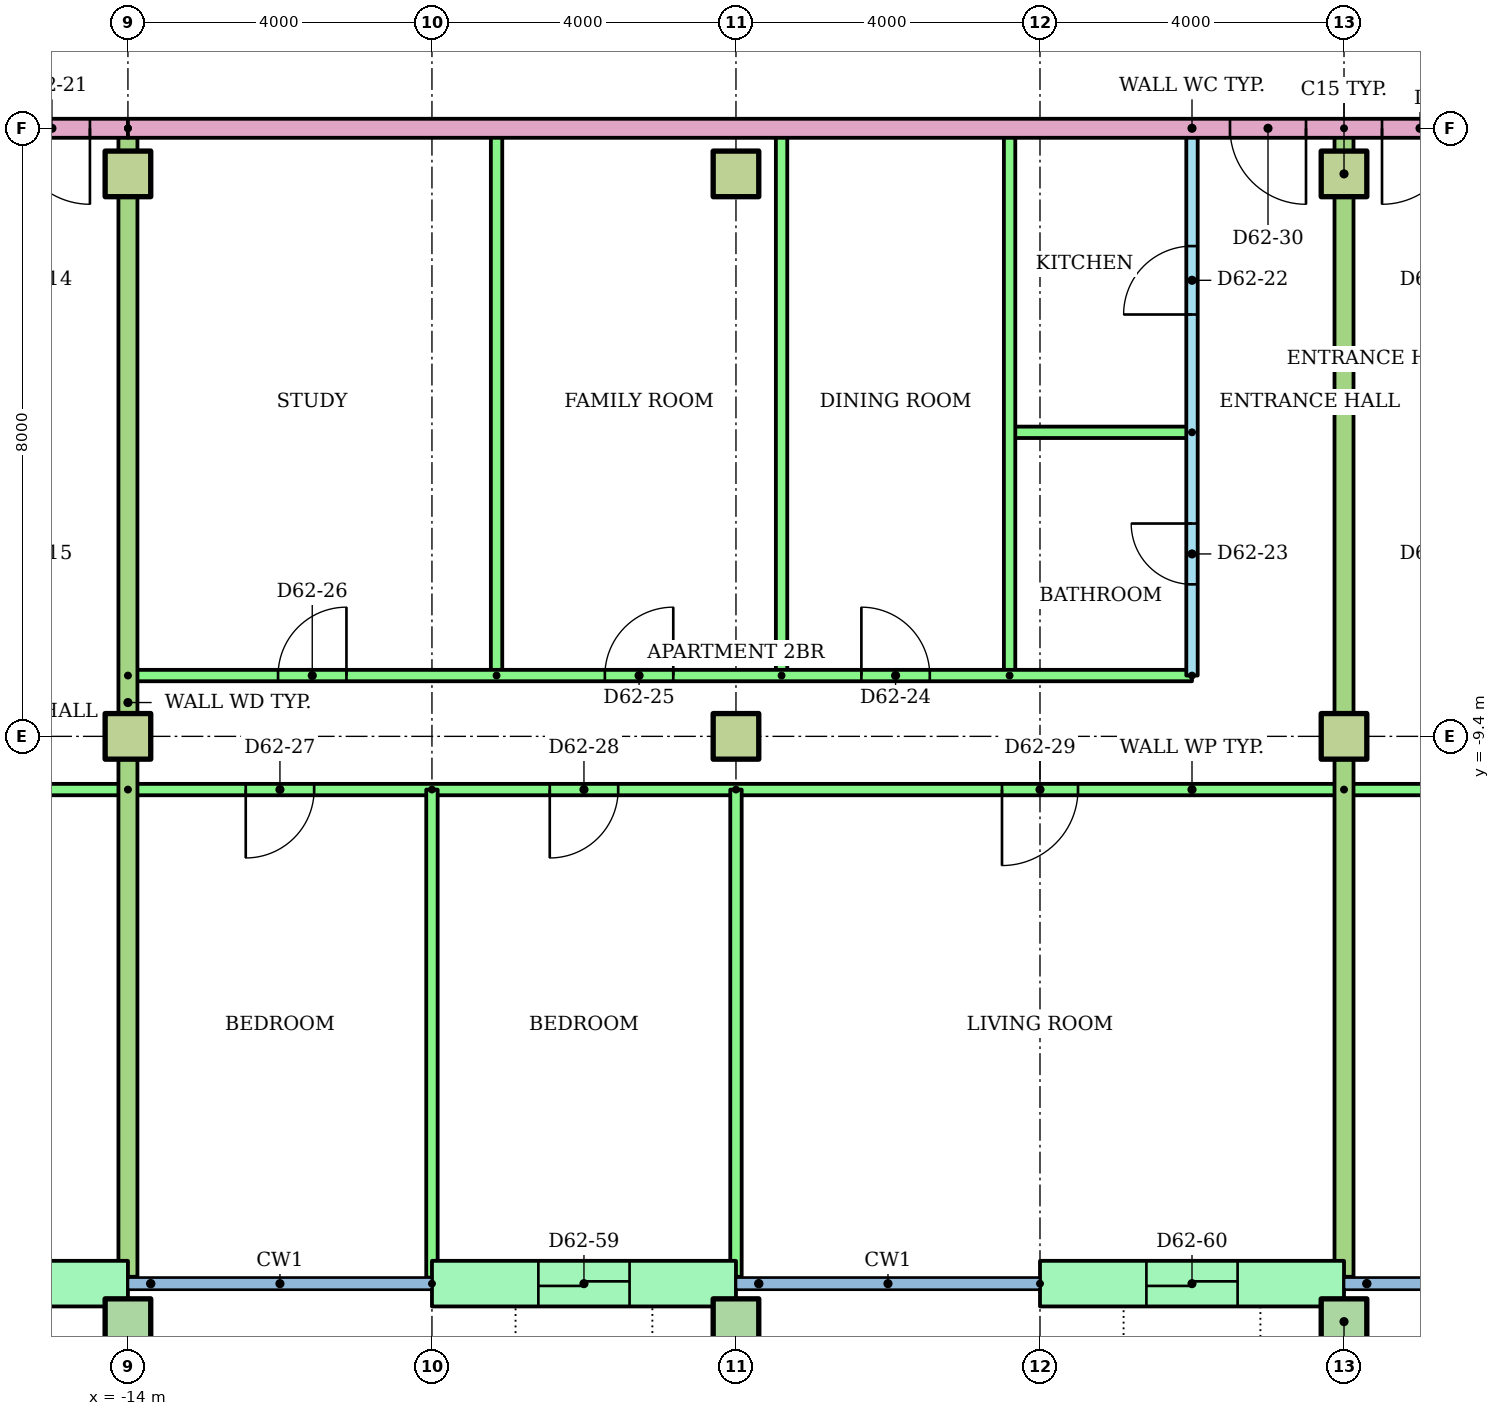
"""IFC4 building model, lengths in metres.
Left out: names, types, materials, properties, quantities, classifications, styles, units other than length and angle.
Written with IfcOpenShell. Run it as: python <this file> out.ifc"""

import sys

from ifc_helpers import new_model, si_unit, direction, frame, frame_2d, origin, origin_2d, place, context, subcontext, project, spatial, rectangle, hollow_rectangle, extrude, element, fill, save


model = new_model("IFC4")
c1 = context("Model", 3, precision=1e-05, world=origin(), true_north=direction((0.0, 1.0)))
c2 = subcontext(c1, "Body", "Model", "MODEL_VIEW")
j1 = project(units=[si_unit("LENGTHUNIT", "METRE"), si_unit("PLANEANGLEUNIT", "RADIAN")], contexts=[c1])
p1 = place(None, origin())
s1 = spatial("IfcSite", under=j1, at=p1, CompositionType="ELEMENT")
p2 = place(p1, origin())
s2 = spatial("IfcBuilding", under=s1, at=p2, CompositionType="ELEMENT")
p3 = place(p2, frame((0.0, 0.0, 236.4)))
s3 = spatial("IfcBuildingStorey", under=s2, at=p3, CompositionType="ELEMENT", Elevation=236.4)
for number, where in (
    (1, (-14.0, -17.1, 0.0)),
    (2, (-6.0, -17.1, 0.0)),
    (3, (2.0, -17.1, 0.0)),
):
    element("IfcColumn", number, at=place(p3, frame(where)), inside=s3, PredefinedType="COLUMN", context=c2, shape_type="SweptSolid", body=[
        extrude(hollow_rectangle(XDim=0.6, YDim=0.6, WallThickness=0.03, at=origin_2d()), origin(), (0.0, 0.0, 1.0), 3.2),
    ])
for number, where in (
    (4, (-14.0, -9.4, 0.0)),
    (5, (-6.0, -9.4, 0.0)),
    (6, (2.0, -9.4, 0.0)),
    (7, (-14.0, -2.0, 0.0)),
    (8, (-6.0, -2.0, 0.0)),
    (9, (2.0, -2.0, 0.0)),
):
    element("IfcColumn", number, at=place(p3, frame(where)), inside=s3, PredefinedType="COLUMN", context=c2, shape_type="SweptSolid", body=[
        extrude(rectangle(XDim=0.6, YDim=0.6, at=origin_2d()), origin(), (0.0, 0.0, 1.0), 3.2),
    ])
p4 = place(p3, frame((-18.0, -16.6, 0.0)))
e10 = element("IfcWall", 10, at=p4, inside=s3, PredefinedType="STANDARD", context=c2, shape_type="SweptSolid", body=[
    extrude(rectangle(XDim=4.0, YDim=0.6, at=frame_2d((2.0, 0.0))), origin(), (0.0, 0.0, 1.0), 2.8),
])
p5 = place(p4, frame((1.4, 0.0, 0.0)))
e11 = element("IfcOpeningElement", 11, at=p5, cuts=e10, PredefinedType="OPENING", context=c2, shape_type="SweptSolid", body=[
    extrude(rectangle(XDim=1.2, YDim=2.1, at=frame_2d((0.6, 1.05))), frame((0.0, 0.31, 0.0), z_axis=(0.0, -1.0, 0.0), x_axis=(1.0, 0.0, 0.0)), (0.0, 0.0, 1.0), 0.62),
])
p6 = place(p3, frame((-10.0, -16.6, 0.0)))
e12 = element("IfcWall", 12, at=p6, inside=s3, PredefinedType="STANDARD", context=c2, shape_type="SweptSolid", body=[
    extrude(rectangle(XDim=4.0, YDim=0.6, at=frame_2d((2.0, 0.0))), origin(), (0.0, 0.0, 1.0), 2.8),
])
p7 = place(p6, frame((1.4, 0.0, 0.0)))
e13 = element("IfcOpeningElement", 13, at=p7, cuts=e12, PredefinedType="OPENING", context=c2, shape_type="SweptSolid", body=[
    extrude(rectangle(XDim=1.2, YDim=2.1, at=frame_2d((0.6, 1.05))), frame((0.0, 0.31, 0.0), z_axis=(0.0, -1.0, 0.0), x_axis=(1.0, 0.0, 0.0)), (0.0, 0.0, 1.0), 0.62),
])
p8 = place(p3, frame((-2.0, -16.6, 0.0)))
e14 = element("IfcWall", 14, at=p8, inside=s3, PredefinedType="STANDARD", context=c2, shape_type="SweptSolid", body=[
    extrude(rectangle(XDim=4.0, YDim=0.6, at=frame_2d((2.0, 0.0))), origin(), (0.0, 0.0, 1.0), 2.8),
])
p9 = place(p8, frame((1.4, 0.0, 0.0)))
e15 = element("IfcOpeningElement", 15, at=p9, cuts=e14, PredefinedType="OPENING", context=c2, shape_type="SweptSolid", body=[
    extrude(rectangle(XDim=1.2, YDim=2.1, at=frame_2d((0.6, 1.05))), frame((0.0, 0.31, 0.0), z_axis=(0.0, -1.0, 0.0), x_axis=(1.0, 0.0, 0.0)), (0.0, 0.0, 1.0), 0.62),
])
p10 = place(p3, frame((-14.0, -10.1, 0.0), z_axis=(0.0, 0.0, 1.0), x_axis=(-1.0, 0.0, 0.0)))
e16 = element("IfcWall", 16, at=p10, inside=s3, PredefinedType="PARTITIONING", context=c2, shape_type="SweptSolid", body=[
    extrude(rectangle(XDim=14.92, YDim=0.15, at=frame_2d((7.46, 0.0))), origin(), (0.0, 0.0, 1.0), 2.4),
])
p11 = place(p10, frame((12.0, 0.0, 0.0)))
e17 = element("IfcOpeningElement", 17, at=p11, cuts=e16, PredefinedType="OPENING", context=c2, shape_type="SweptSolid", body=[
    extrude(rectangle(XDim=0.9, YDim=2.1, at=frame_2d((0.45, 1.05))), frame((0.0, 0.085, 0.0), z_axis=(0.0, -1.0, 0.0), x_axis=(1.0, 0.0, 0.0)), (0.0, 0.0, 1.0), 0.17),
])
p12 = place(p10, frame((6.624, 0.0, 0.0)))
e18 = element("IfcOpeningElement", 18, at=p12, cuts=e16, PredefinedType="OPENING", context=c2, shape_type="SweptSolid", body=[
    extrude(rectangle(XDim=0.9, YDim=2.1, at=frame_2d((0.45, 1.05))), frame((0.0, 0.085, 0.0), z_axis=(0.0, -1.0, 0.0), x_axis=(1.0, 0.0, 0.0)), (0.0, 0.0, 1.0), 0.17),
])
p13 = place(p10, frame((1.5, 0.0, 0.0)))
e19 = element("IfcOpeningElement", 19, at=p13, cuts=e16, PredefinedType="OPENING", context=c2, shape_type="SweptSolid", body=[
    extrude(rectangle(XDim=1.0, YDim=2.1, at=frame_2d((0.5, 1.05))), frame((0.0, 0.085, 0.0), z_axis=(0.0, -1.0, 0.0), x_axis=(1.0, 0.0, 0.0)), (0.0, 0.0, 1.0), 0.17),
])
p14 = place(p3, frame((0.0, -8.6, 0.0), z_axis=(0.0, 0.0, 1.0), x_axis=(0.0, 1.0, 0.0)))
e20 = element("IfcWall", 20, at=p14, inside=s3, PredefinedType="PARTITIONING", context=c2, shape_type="SweptSolid", body=[
    extrude(rectangle(XDim=7.2, YDim=0.15, at=frame_2d((3.6, 0.0))), origin(), (0.0, 0.0, 1.0), 2.4),
])
p15 = place(p14, frame((4.75, 0.0, 0.0)))
e21 = element("IfcOpeningElement", 21, at=p15, cuts=e20, PredefinedType="OPENING", context=c2, shape_type="SweptSolid", body=[
    extrude(rectangle(XDim=0.9, YDim=2.1, at=frame_2d((0.45, 1.05))), frame((0.0, 0.085, 0.0), z_axis=(0.0, -1.0, 0.0), x_axis=(1.0, 0.0, 0.0)), (0.0, 0.0, 1.0), 0.17),
])
p16 = place(p14, frame((1.2, 0.0, 0.0)))
e22 = element("IfcOpeningElement", 22, at=p16, cuts=e20, PredefinedType="OPENING", context=c2, shape_type="SweptSolid", body=[
    extrude(rectangle(XDim=0.8, YDim=2.1, at=frame_2d((0.4, 1.05))), frame((0.0, 0.085, 0.0), z_axis=(0.0, -1.0, 0.0), x_axis=(1.0, 0.0, 0.0)), (0.0, 0.0, 1.0), 0.17),
])
p17 = place(p3, frame((0.0, -5.4, 0.0), z_axis=(0.0, 0.0, 1.0), x_axis=(-1.0, 0.0, 0.0)))
e23 = element("IfcWall", 23, at=p17, inside=s3, PredefinedType="PARTITIONING", context=c2, shape_type="SweptSolid", body=[
    extrude(rectangle(XDim=2.4, YDim=0.15, at=frame_2d((1.2, 0.0))), origin(), (0.0, 0.0, 1.0), 2.4),
])
for number, where, z_axis, x_axis in (
    (24, (-2.4, -8.6, 0.0), (0.0, 0.0, 1.0), (0.0, 1.0, 0.0)),
    (25, (-5.4, -8.6, 0.0), (0.0, 0.0, 1.0), (0.0, 1.0, 0.0)),
    (26, (-9.15, -8.6, 0.0), (0.0, 0.0, 1.0), (0.0, 1.0, 0.0)),
):
    element("IfcWall", number, at=place(p3, frame(where, z_axis=z_axis, x_axis=x_axis)), inside=s3, PredefinedType="PARTITIONING", context=c2, shape_type="SweptSolid", body=[
        extrude(rectangle(XDim=7.2, YDim=0.15, at=frame_2d((3.6, 0.0))), origin(), (0.0, 0.0, 1.0), 2.4),
    ])
p18 = place(p3, frame((-14.0, -8.6, 0.0)))
e27 = element("IfcWall", 27, at=p18, inside=s3, PredefinedType="PARTITIONING", context=c2, shape_type="SweptSolid", body=[
    extrude(rectangle(XDim=14.0, YDim=0.15, at=frame_2d((7.0, 0.0))), origin(), (0.0, 0.0, 1.0), 2.4),
])
p19 = place(p18, frame((9.65, 0.0, 0.0)))
e28 = element("IfcOpeningElement", 28, at=p19, cuts=e27, PredefinedType="OPENING", context=c2, shape_type="SweptSolid", body=[
    extrude(rectangle(XDim=0.9, YDim=2.1, at=frame_2d((0.45, 1.05))), frame((0.0, 0.085, 0.0), z_axis=(0.0, -1.0, 0.0), x_axis=(1.0, 0.0, 0.0)), (0.0, 0.0, 1.0), 0.17),
])
p20 = place(p18, frame((6.275, 0.0, 0.0)))
e29 = element("IfcOpeningElement", 29, at=p20, cuts=e27, PredefinedType="OPENING", context=c2, shape_type="SweptSolid", body=[
    extrude(rectangle(XDim=0.9, YDim=2.1, at=frame_2d((0.45, 1.05))), frame((0.0, 0.085, 0.0), z_axis=(0.0, -1.0, 0.0), x_axis=(1.0, 0.0, 0.0)), (0.0, 0.0, 1.0), 0.17),
])
p21 = place(p18, frame((1.975, 0.0, 0.0)))
e30 = element("IfcOpeningElement", 30, at=p21, cuts=e27, PredefinedType="OPENING", context=c2, shape_type="SweptSolid", body=[
    extrude(rectangle(XDim=0.9, YDim=2.1, at=frame_2d((0.45, 1.05))), frame((0.0, 0.085, 0.0), z_axis=(0.0, -1.0, 0.0), x_axis=(1.0, 0.0, 0.0)), (0.0, 0.0, 1.0), 0.17),
])
p22 = place(p3, frame((2.0, -10.1, 0.0), z_axis=(0.0, 0.0, 1.0), x_axis=(-1.0, 0.0, 0.0)))
e31 = element("IfcWall", 31, at=p22, inside=s3, PredefinedType="PARTITIONING", context=c2, shape_type="SweptSolid", body=[
    extrude(rectangle(XDim=16.0, YDim=0.15, at=frame_2d((8.0, 0.0))), origin(), (0.0, 0.0, 1.0), 2.4),
])
p23 = place(p22, frame((13.55, 0.0, 0.0)))
e32 = element("IfcOpeningElement", 32, at=p23, cuts=e31, PredefinedType="OPENING", context=c2, shape_type="SweptSolid", body=[
    extrude(rectangle(XDim=0.9, YDim=2.1, at=frame_2d((0.45, 1.05))), frame((0.0, 0.085, 0.0), z_axis=(0.0, -1.0, 0.0), x_axis=(1.0, 0.0, 0.0)), (0.0, 0.0, 1.0), 0.17),
])
p24 = place(p22, frame((9.55, 0.0, 0.0)))
e33 = element("IfcOpeningElement", 33, at=p24, cuts=e31, PredefinedType="OPENING", context=c2, shape_type="SweptSolid", body=[
    extrude(rectangle(XDim=0.9, YDim=2.1, at=frame_2d((0.45, 1.05))), frame((0.0, 0.085, 0.0), z_axis=(0.0, -1.0, 0.0), x_axis=(1.0, 0.0, 0.0)), (0.0, 0.0, 1.0), 0.17),
])
p25 = place(p22, frame((3.5, 0.0, 0.0)))
e34 = element("IfcOpeningElement", 34, at=p25, cuts=e31, PredefinedType="OPENING", context=c2, shape_type="SweptSolid", body=[
    extrude(rectangle(XDim=1.0, YDim=2.1, at=frame_2d((0.5, 1.05))), frame((0.0, 0.085, 0.0), z_axis=(0.0, -1.0, 0.0), x_axis=(1.0, 0.0, 0.0)), (0.0, 0.0, 1.0), 0.17),
])
p26 = place(p3, frame((-10.0, -10.1, 0.0), z_axis=(0.0, 0.0, 1.0), x_axis=(0.0, -1.0, 0.0)))
e35 = element("IfcWall", 35, at=p26, inside=s3, PredefinedType="PARTITIONING", context=c2, shape_type="SweptSolid", body=[
    extrude(rectangle(XDim=6.421, YDim=0.15, at=frame_2d((3.21, 0.0))), origin(), (0.0, 0.0, 1.0), 2.4),
])
p27 = place(p3, frame((-6.0, -10.1, 0.0), z_axis=(0.0, 0.0, 1.0), x_axis=(0.0, -1.0, 0.0)))
e36 = element("IfcWall", 36, at=p27, inside=s3, PredefinedType="PARTITIONING", context=c2, shape_type="SweptSolid", body=[
    extrude(rectangle(XDim=6.41, YDim=0.15, at=frame_2d((3.205, 0.0))), origin(), (0.0, 0.0, 1.0), 2.4),
])
p28 = place(p3, frame((-14.0, -1.4, 0.0), z_axis=(0.0, 0.0, 1.0), x_axis=(0.0, -1.0, 0.0)))
e37 = element("IfcWall", 37, at=p28, inside=s3, PredefinedType="PARTITIONING", context=c2, shape_type="SweptSolid", body=[
    extrude(rectangle(XDim=15.11, YDim=0.25, at=frame_2d((7.555, 0.0))), origin(), (0.0, 0.0, 1.0), 2.4),
])
p29 = place(p3, frame((28.92, -10.1, 0.0), z_axis=(0.0, 0.0, 1.0), x_axis=(-1.0, 0.0, 0.0)))
e38 = element("IfcWall", 38, at=p29, inside=s3, PredefinedType="PARTITIONING", context=c2, shape_type="SweptSolid", body=[
    extrude(rectangle(XDim=26.92, YDim=0.15, at=frame_2d((13.46, 0.0))), origin(), (0.0, 0.0, 1.0), 2.4),
])
p30 = place(p29, frame((22.42, 0.0, 0.0)))
e39 = element("IfcOpeningElement", 39, at=p30, cuts=e38, PredefinedType="OPENING", context=c2, shape_type="SweptSolid", body=[
    extrude(rectangle(XDim=1.0, YDim=2.1, at=frame_2d((0.5, 1.05))), frame((0.0, 0.085, 0.0), z_axis=(0.0, -1.0, 0.0), x_axis=(1.0, 0.0, 0.0)), (0.0, 0.0, 1.0), 0.17),
])
p31 = place(p29, frame((16.47, 0.0, 0.0)))
e40 = element("IfcOpeningElement", 40, at=p31, cuts=e38, PredefinedType="OPENING", context=c2, shape_type="SweptSolid", body=[
    extrude(rectangle(XDim=0.9, YDim=2.1, at=frame_2d((0.45, 1.05))), frame((0.0, 0.085, 0.0), z_axis=(0.0, -1.0, 0.0), x_axis=(1.0, 0.0, 0.0)), (0.0, 0.0, 1.0), 0.17),
])
p32 = place(p29, frame((12.47, 0.0, 0.0)))
e41 = element("IfcOpeningElement", 41, at=p32, cuts=e38, PredefinedType="OPENING", context=c2, shape_type="SweptSolid", body=[
    extrude(rectangle(XDim=0.9, YDim=2.1, at=frame_2d((0.45, 1.05))), frame((0.0, 0.085, 0.0), z_axis=(0.0, -1.0, 0.0), x_axis=(1.0, 0.0, 0.0)), (0.0, 0.0, 1.0), 0.17),
])
p33 = place(p29, frame((7.37, 0.0, 0.0)))
e42 = element("IfcOpeningElement", 42, at=p33, cuts=e38, PredefinedType="OPENING", context=c2, shape_type="SweptSolid", body=[
    extrude(rectangle(XDim=0.9, YDim=2.1, at=frame_2d((0.45, 1.05))), frame((0.0, 0.085, 0.0), z_axis=(0.0, -1.0, 0.0), x_axis=(1.0, 0.0, 0.0)), (0.0, 0.0, 1.0), 0.17),
])
p34 = place(p29, frame((1.544, 0.0, 0.0)))
e43 = element("IfcOpeningElement", 43, at=p34, cuts=e38, PredefinedType="OPENING", context=c2, shape_type="SweptSolid", body=[
    extrude(rectangle(XDim=0.9, YDim=2.1, at=frame_2d((0.45, 1.05))), frame((0.0, 0.085, 0.0), z_axis=(0.0, -1.0, 0.0), x_axis=(1.0, 0.0, 0.0)), (0.0, 0.0, 1.0), 0.17),
])
p35 = place(p3, frame((2.0, -1.4, 0.0), z_axis=(0.0, 0.0, 1.0), x_axis=(0.0, -1.0, 0.0)))
e44 = element("IfcWall", 44, at=p35, inside=s3, PredefinedType="PARTITIONING", context=c2, shape_type="SweptSolid", body=[
    extrude(rectangle(XDim=15.11, YDim=0.25, at=frame_2d((7.555, 0.0))), origin(), (0.0, 0.0, 1.0), 2.4),
])
p36 = place(p3, frame((-14.0, -1.4, 0.0), z_axis=(0.0, 0.0, 1.0), x_axis=(-1.0, 0.0, 0.0)))
e45 = element("IfcWall", 45, at=p36, inside=s3, PredefinedType="PARTITIONING", context=c2, shape_type="SweptSolid", body=[
    extrude(rectangle(XDim=14.92, YDim=0.25, at=frame_2d((7.46, 0.0))), origin(), (0.0, 0.0, 1.0), 2.4),
])
p37 = place(p36, frame((0.5, 0.0, 0.0)))
e46 = element("IfcOpeningElement", 46, at=p37, cuts=e45, PredefinedType="OPENING", context=c2, shape_type="SweptSolid", body=[
    extrude(rectangle(XDim=1.0, YDim=2.1, at=frame_2d((0.5, 1.05))), frame((0.0, 0.135, 0.0), z_axis=(0.0, -1.0, 0.0), x_axis=(1.0, 0.0, 0.0)), (0.0, 0.0, 1.0), 0.27),
])
p38 = place(p3, frame((14.0, -1.4, 0.0), z_axis=(0.0, 0.0, 1.0), x_axis=(-1.0, 0.0, 0.0)))
e47 = element("IfcWall", 47, at=p38, inside=s3, PredefinedType="PARTITIONING", context=c2, shape_type="SweptSolid", body=[
    extrude(rectangle(XDim=28.0, YDim=0.25, at=frame_2d((14.0, 0.0))), origin(), (0.0, 0.0, 1.0), 2.4),
])
p39 = place(p38, frame((12.5, 0.0, 0.0)))
e48 = element("IfcOpeningElement", 48, at=p39, cuts=e47, PredefinedType="OPENING", context=c2, shape_type="SweptSolid", body=[
    extrude(rectangle(XDim=1.0, YDim=2.1, at=frame_2d((0.5, 1.05))), frame((0.0, 0.135, 0.0), z_axis=(0.0, -1.0, 0.0), x_axis=(1.0, 0.0, 0.0)), (0.0, 0.0, 1.0), 0.27),
])
p40 = place(p38, frame((10.5, 0.0, 0.0)))
e49 = element("IfcOpeningElement", 49, at=p40, cuts=e47, PredefinedType="OPENING", context=c2, shape_type="SweptSolid", body=[
    extrude(rectangle(XDim=1.0, YDim=2.1, at=frame_2d((0.5, 1.05))), frame((0.0, 0.135, 0.0), z_axis=(0.0, -1.0, 0.0), x_axis=(1.0, 0.0, 0.0)), (0.0, 0.0, 1.0), 0.27),
])
p41 = place(p37, origin())
e50 = element("IfcDoor", 50, at=p41, inside=s3, OperationType="SINGLE_SWING_LEFT", PredefinedType="DOOR", context=c2, shape_type="SweptSolid", body=[
    extrude(rectangle(XDim=1.0, YDim=2.1, at=frame_2d((0.5, 1.05))), frame((0.0, 0.025, 0.0), z_axis=(0.0, -1.0, 0.0), x_axis=(1.0, 0.0, 0.0)), (0.0, 0.0, 1.0), 0.05),
])
fill(e46, e50)
p42 = place(p15, origin())
e51 = element("IfcDoor", 51, at=p42, inside=s3, OperationType="SINGLE_SWING_LEFT", PredefinedType="DOOR", context=c2, shape_type="SweptSolid", body=[
    extrude(rectangle(XDim=0.9, YDim=2.1, at=frame_2d((0.45, 1.05))), frame((0.0, 0.025, 0.0), z_axis=(0.0, -1.0, 0.0), x_axis=(1.0, 0.0, 0.0)), (0.0, 0.0, 1.0), 0.05),
])
fill(e21, e51)
p43 = place(p16, origin())
e52 = element("IfcDoor", 52, at=p43, inside=s3, OperationType="SINGLE_SWING_RIGHT", PredefinedType="DOOR", context=c2, shape_type="SweptSolid", body=[
    extrude(rectangle(XDim=0.8, YDim=2.1, at=frame_2d((0.4, 1.05))), frame((0.0, 0.025, 0.0), z_axis=(0.0, -1.0, 0.0), x_axis=(1.0, 0.0, 0.0)), (0.0, 0.0, 1.0), 0.05),
])
fill(e22, e52)
p44 = place(p19, origin())
e53 = element("IfcDoor", 53, at=p44, inside=s3, OperationType="SINGLE_SWING_LEFT", PredefinedType="DOOR", context=c2, shape_type="SweptSolid", body=[
    extrude(rectangle(XDim=0.9, YDim=2.1, at=frame_2d((0.45, 1.05))), frame((0.0, 0.025, 0.0), z_axis=(0.0, -1.0, 0.0), x_axis=(1.0, 0.0, 0.0)), (0.0, 0.0, 1.0), 0.05),
])
fill(e28, e53)
p45 = place(p20, origin())
e54 = element("IfcDoor", 54, at=p45, inside=s3, OperationType="SINGLE_SWING_RIGHT", PredefinedType="DOOR", context=c2, shape_type="SweptSolid", body=[
    extrude(rectangle(XDim=0.9, YDim=2.1, at=frame_2d((0.45, 1.05))), frame((0.0, 0.025, 0.0), z_axis=(0.0, -1.0, 0.0), x_axis=(1.0, 0.0, 0.0)), (0.0, 0.0, 1.0), 0.05),
])
fill(e29, e54)
p46 = place(p21, origin())
e55 = element("IfcDoor", 55, at=p46, inside=s3, OperationType="SINGLE_SWING_RIGHT", PredefinedType="DOOR", context=c2, shape_type="SweptSolid", body=[
    extrude(rectangle(XDim=0.9, YDim=2.1, at=frame_2d((0.45, 1.05))), frame((0.0, 0.025, 0.0), z_axis=(0.0, -1.0, 0.0), x_axis=(1.0, 0.0, 0.0)), (0.0, 0.0, 1.0), 0.05),
])
fill(e30, e55)
p47 = place(p23, origin())
e56 = element("IfcDoor", 56, at=p47, inside=s3, OperationType="SINGLE_SWING_RIGHT", PredefinedType="DOOR", context=c2, shape_type="SweptSolid", body=[
    extrude(rectangle(XDim=0.9, YDim=2.1, at=frame_2d((0.45, 1.05))), frame((0.0, 0.025, 0.0), z_axis=(0.0, -1.0, 0.0), x_axis=(1.0, 0.0, 0.0)), (0.0, 0.0, 1.0), 0.05),
])
fill(e32, e56)
p48 = place(p24, origin())
e57 = element("IfcDoor", 57, at=p48, inside=s3, OperationType="SINGLE_SWING_RIGHT", PredefinedType="DOOR", context=c2, shape_type="SweptSolid", body=[
    extrude(rectangle(XDim=0.9, YDim=2.1, at=frame_2d((0.45, 1.05))), frame((0.0, 0.025, 0.0), z_axis=(0.0, -1.0, 0.0), x_axis=(1.0, 0.0, 0.0)), (0.0, 0.0, 1.0), 0.05),
])
fill(e33, e57)
p49 = place(p25, origin())
e58 = element("IfcDoor", 58, at=p49, inside=s3, OperationType="SINGLE_SWING_RIGHT", PredefinedType="DOOR", context=c2, shape_type="SweptSolid", body=[
    extrude(rectangle(XDim=1.0, YDim=2.1, at=frame_2d((0.5, 1.05))), frame((0.0, 0.025, 0.0), z_axis=(0.0, -1.0, 0.0), x_axis=(1.0, 0.0, 0.0)), (0.0, 0.0, 1.0), 0.05),
])
fill(e34, e58)
p50 = place(p39, origin())
e59 = element("IfcDoor", 59, at=p50, inside=s3, OperationType="SINGLE_SWING_LEFT", PredefinedType="DOOR", context=c2, shape_type="SweptSolid", body=[
    extrude(rectangle(XDim=1.0, YDim=2.1, at=frame_2d((0.5, 1.05))), frame((0.0, 0.025, 0.0), z_axis=(0.0, -1.0, 0.0), x_axis=(1.0, 0.0, 0.0)), (0.0, 0.0, 1.0), 0.05),
])
fill(e48, e59)
p51 = place(p40, origin())
e60 = element("IfcDoor", 60, at=p51, inside=s3, OperationType="SINGLE_SWING_RIGHT", PredefinedType="DOOR", context=c2, shape_type="SweptSolid", body=[
    extrude(rectangle(XDim=1.0, YDim=2.1, at=frame_2d((0.5, 1.05))), frame((0.0, 0.025, 0.0), z_axis=(0.0, -1.0, 0.0), x_axis=(1.0, 0.0, 0.0)), (0.0, 0.0, 1.0), 0.05),
])
fill(e49, e60)
p52 = place(p7, origin())
e61 = element("IfcDoor", 61, at=p52, inside=s3, OperationType="SLIDING_TO_LEFT", PredefinedType="DOOR", context=c2, shape_type="SweptSolid", body=[
    extrude(rectangle(XDim=1.2, YDim=2.1, at=frame_2d((0.6, 1.05))), frame((0.0, 0.025, 0.0), z_axis=(0.0, -1.0, 0.0), x_axis=(1.0, 0.0, 0.0)), (0.0, 0.0, 1.0), 0.05),
])
fill(e13, e61)
p53 = place(p9, origin())
e62 = element("IfcDoor", 62, at=p53, inside=s3, OperationType="SLIDING_TO_LEFT", PredefinedType="DOOR", context=c2, shape_type="SweptSolid", body=[
    extrude(rectangle(XDim=1.2, YDim=2.1, at=frame_2d((0.6, 1.05))), frame((0.0, 0.025, 0.0), z_axis=(0.0, -1.0, 0.0), x_axis=(1.0, 0.0, 0.0)), (0.0, 0.0, 1.0), 0.05),
])
fill(e15, e62)
save(model, sys.argv[1])
